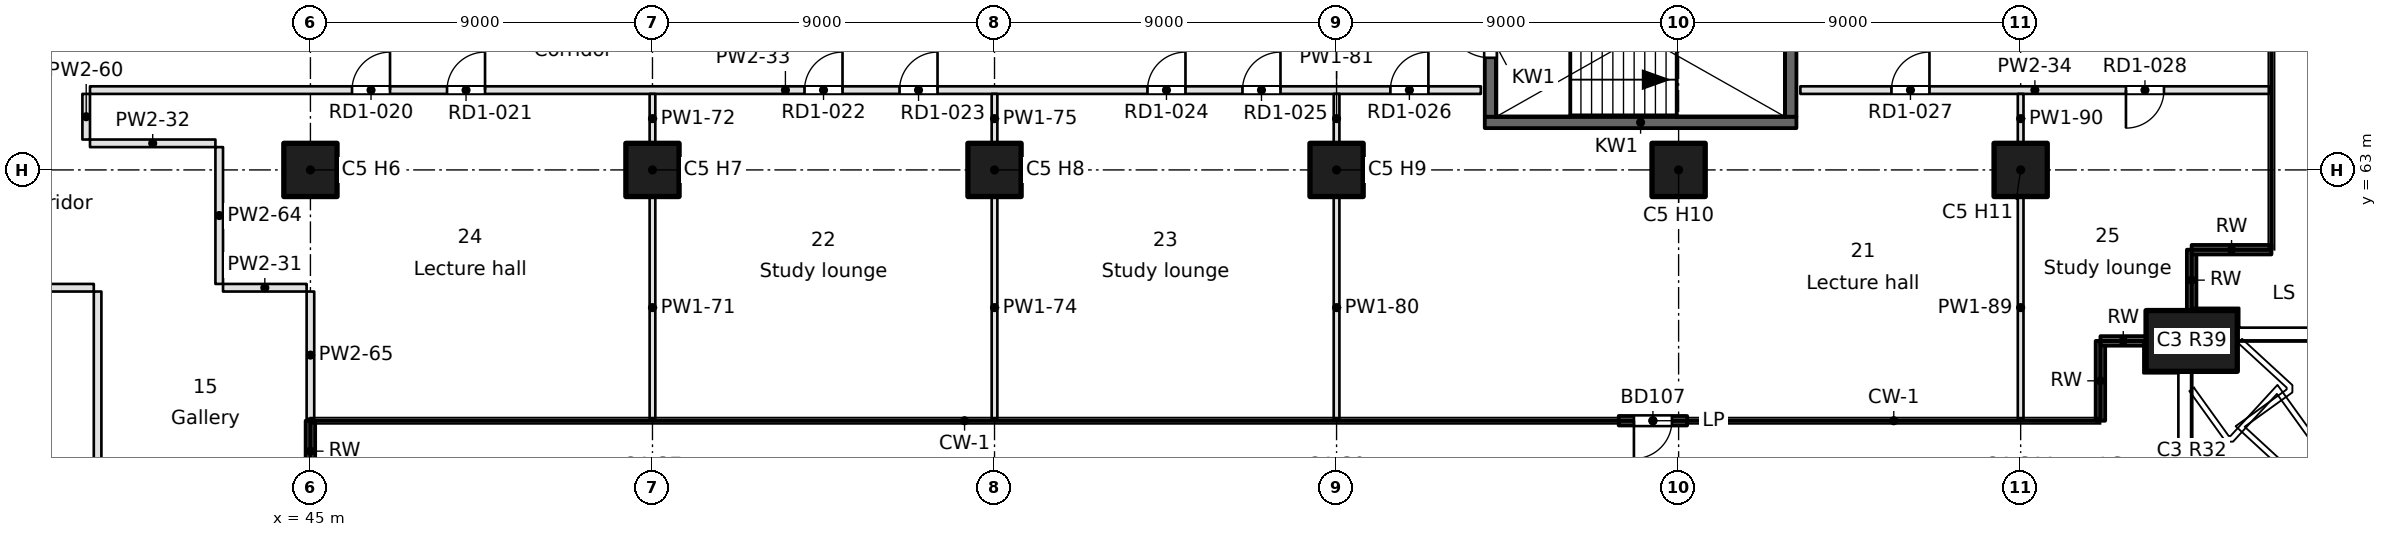
"""IFC4 building model, lengths in metres.
Left out: names, types, materials, properties, quantities, classifications, styles, units other than length and angle.
Written with IfcOpenShell. Run it as: python <this file> out.ifc"""

import sys

from ifc_helpers import new_model, si_unit, direction, frame, frame_2d, origin, origin_2d, place, context, subcontext, project, spatial, rectangle, extrude, element, fill, save


model = new_model("IFC4")
c1 = context("Model", 3, precision=1e-05, world=origin(), true_north=direction((0.0, 1.0)))
c2 = subcontext(c1, "Body", "Model", "MODEL_VIEW")
j1 = project(units=[si_unit("LENGTHUNIT", "METRE"), si_unit("PLANEANGLEUNIT", "RADIAN")], contexts=[c1])
p1 = place(None, origin())
s1 = spatial("IfcSite", under=j1, at=p1, CompositionType="ELEMENT")
p2 = place(p1, origin())
s2 = spatial("IfcBuilding", under=s1, at=p2, CompositionType="ELEMENT")
p3 = place(p2, frame((0.0, 0.0, 72.8)))
s3 = spatial("IfcBuildingStorey", under=s2, at=p3, CompositionType="ELEMENT", Elevation=72.8)
p4 = place(p3, frame((94.5, 58.5, 0.0), z_axis=(0.0, 0.0, 1.0), x_axis=(1.0, 0.0, 0.0)))
e1 = element("IfcColumn", 1, at=p4, inside=s3, PredefinedType="COLUMN", context=c2, shape_type="SweptSolid", body=[
    extrude(rectangle(XDim=2.4, YDim=1.6, at=origin_2d()), origin(), (0.0, 0.0, 1.0), 3.7),
])
for number, where, z_axis, x_axis in (
    (2, (45.0, 63.0, 0.0), (0.0, 0.0, 1.0), (1.0, 0.0, 0.0)),
    (3, (54.0, 63.0, 0.0), (0.0, 0.0, 1.0), (1.0, 0.0, 0.0)),
    (4, (63.0, 63.0, 0.0), (0.0, 0.0, 1.0), (1.0, 0.0, 0.0)),
    (5, (72.0, 63.0, 0.0), (0.0, 0.0, 1.0), (1.0, 0.0, 0.0)),
    (6, (81.0, 63.0, 0.0), (0.0, 0.0, 1.0), (1.0, 0.0, 0.0)),
    (7, (90.0, 63.0, 0.0), (0.0, 0.0, 1.0), (1.0, 0.0, 0.0)),
):
    element("IfcColumn", number, at=place(p3, frame(where, z_axis=z_axis, x_axis=x_axis)), inside=s3, PredefinedType="COLUMN", context=c2, shape_type="SweptSolid", body=[
        extrude(rectangle(XDim=1.4, YDim=1.4, at=origin_2d()), origin(), (0.0, 0.0, 1.0), 3.7),
    ])
p5 = place(p3, frame((44.999, 54.8, 0.0), z_axis=(0.0, 0.0, 1.0), x_axis=(0.000152508767, 0.999999988371, 0.0)))
e8 = element("IfcWall", 8, at=p5, inside=s3, PredefinedType="SOLIDWALL", context=c2, shape_type="SweptSolid", body=[
    extrude(rectangle(XDim=1.601, YDim=0.25, at=frame_2d((0.8, 0.0))), origin(), (0.0, 0.0, 1.0), 3.3),
])
p6 = place(p3, frame((79.424, 56.401, 0.0), z_axis=(0.0, 0.0, 1.0), x_axis=(1.0, 0.0, 0.0)))
e9 = element("IfcWall", 9, at=p6, inside=s3, PredefinedType="SOLIDWALL", context=c2, shape_type="SweptSolid", body=[
    extrude(rectangle(XDim=1.8, YDim=0.25, at=frame_2d((0.9, 0.0))), origin(), (0.0, 0.0, 1.0), 3.3),
])
p7 = place(p6, frame((0.4, 0.0, 0.0)))
e10 = element("IfcOpeningElement", 10, at=p7, cuts=e9, PredefinedType="OPENING", context=c2, shape_type="SweptSolid", body=[
    extrude(rectangle(XDim=1.0, YDim=2.1, at=frame_2d((0.5, 1.05))), frame((0.0, 0.125, 0.0), z_axis=(0.0, -1.0, 0.0), x_axis=(1.0, 0.0, 0.0)), (0.0, 0.0, 1.0), 0.25),
])
p8 = place(p3, frame((92.099, 56.401, 0.0), z_axis=(0.0, 0.0, 1.0), x_axis=(0.00011626555, 0.999999993241, 0.0)))
e11 = element("IfcWall", 11, at=p8, inside=s3, PredefinedType="SOLIDWALL", context=c2, shape_type="SweptSolid", body=[
    extrude(rectangle(XDim=2.1, YDim=0.25, at=frame_2d((1.05, 0.0))), origin(), (0.0, 0.0, 1.0), 3.3),
])
p9 = place(p3, frame((92.099, 58.501, 0.0), z_axis=(0.0, 0.0, 1.0), x_axis=(1.0, 0.0, 0.0)))
e12 = element("IfcWall", 12, at=p9, inside=s3, PredefinedType="SOLIDWALL", context=c2, shape_type="SweptSolid", body=[
    extrude(rectangle(XDim=1.201, YDim=0.25, at=frame_2d((0.6, 0.0))), origin(), (0.0, 0.0, 1.0), 3.3),
])
p10 = place(p3, frame((94.499, 59.3, 0.0), z_axis=(0.0, 0.0, 1.0), x_axis=(0.00015253203, 0.999999988367, 0.0)))
e13 = element("IfcWall", 13, at=p10, inside=s3, PredefinedType="SOLIDWALL", context=c2, shape_type="SweptSolid", body=[
    extrude(rectangle(XDim=1.601, YDim=0.25, at=frame_2d((0.8, 0.0))), origin(), (0.0, 0.0, 1.0), 3.3),
])
p11 = place(p3, frame((94.499, 60.901, 0.0), z_axis=(0.0, 0.0, 1.0), x_axis=(0.999999993241, 0.00011626555, 0.0)))
e14 = element("IfcWall", 14, at=p11, inside=s3, PredefinedType="SOLIDWALL", context=c2, shape_type="SweptSolid", body=[
    extrude(rectangle(XDim=2.1, YDim=0.25, at=frame_2d((1.05, 0.0))), origin(), (0.0, 0.0, 1.0), 3.3),
])
p12 = place(p3, frame((75.9, 64.25, -0.4), z_axis=(0.0, 0.0, 1.0), x_axis=(1.0, 0.0, 0.0)))
e15 = element("IfcWall", 15, at=p12, inside=s3, PredefinedType="SOLIDWALL", context=c2, shape_type="SweptSolid", body=[
    extrude(rectangle(XDim=8.2, YDim=0.3, at=frame_2d((4.1, 0.0))), origin(), (0.0, 0.0, 1.0), 3.7),
])
p13 = place(p3, frame((76.05, 64.4, -0.4), z_axis=(0.0, 0.0, 1.0), x_axis=(0.0, 1.0, 0.0)))
e16 = element("IfcWall", 16, at=p13, inside=s3, PredefinedType="SOLIDWALL", context=c2, shape_type="SweptSolid", body=[
    extrude(rectangle(XDim=4.3, YDim=0.3, at=frame_2d((2.15, 0.0))), origin(), (0.0, 0.0, 1.0), 3.7),
])
p14 = place(p13, frame((1.55, 0.0, 0.4)))
e17 = element("IfcOpeningElement", 17, at=p14, cuts=e16, PredefinedType="OPENING", context=c2, shape_type="SweptSolid", body=[
    extrude(rectangle(XDim=1.2, YDim=2.1, at=frame_2d((0.6, 1.05))), frame((0.0, 0.15, 0.0), z_axis=(0.0, -1.0, 0.0), x_axis=(1.0, 0.0, 0.0)), (0.0, 0.0, 1.0), 0.3),
])
p15 = place(p3, frame((83.95, 64.4, -0.4), z_axis=(0.0, 0.0, 1.0), x_axis=(0.0, 1.0, 0.0)))
e18 = element("IfcWall", 18, at=p15, inside=s3, PredefinedType="SOLIDWALL", context=c2, shape_type="SweptSolid", body=[
    extrude(rectangle(XDim=4.3, YDim=0.3, at=frame_2d((2.15, 0.0))), origin(), (0.0, 0.0, 1.0), 3.7),
])
p16 = place(p3, frame((39.3, 59.9, 0.0), z_axis=(0.0, 0.0, 1.0), x_axis=(-1.0, 0.0, 0.0)))
e19 = element("IfcWall", 19, at=p16, inside=s3, PredefinedType="PARTITIONING", context=c2, shape_type="SweptSolid", body=[
    extrude(rectangle(XDim=11.8, YDim=0.2, at=frame_2d((5.9, 0.0))), origin(), (0.0, 0.0, 1.0), 3.3),
])
p17 = place(p3, frame((42.7, 59.9, 0.0), z_axis=(0.0, 0.0, 1.0), x_axis=(1.0, 0.0, 0.0)))
e20 = element("IfcWall", 20, at=p17, inside=s3, PredefinedType="PARTITIONING", context=c2, shape_type="SweptSolid", body=[
    extrude(rectangle(XDim=2.2, YDim=0.2, at=frame_2d((1.1, 0.0))), origin(), (0.0, 0.0, 1.0), 3.3),
])
p18 = place(p3, frame((39.2, 63.7, 0.0), z_axis=(0.0, 0.0, 1.0), x_axis=(1.0, 0.0, 0.0)))
e21 = element("IfcWall", 21, at=p18, inside=s3, PredefinedType="PARTITIONING", context=c2, shape_type="SweptSolid", body=[
    extrude(rectangle(XDim=3.3, YDim=0.2, at=frame_2d((1.65, 0.0))), origin(), (0.0, 0.0, 1.0), 3.3),
])
p19 = place(p3, frame((75.796, 65.1, 0.0), z_axis=(0.0, 0.0, 1.0), x_axis=(-1.0, 0.0, 0.0)))
e22 = element("IfcWall", 22, at=p19, inside=s3, PredefinedType="PARTITIONING", context=c2, shape_type="SweptSolid", body=[
    extrude(rectangle(XDim=36.596, YDim=0.2, at=frame_2d((18.298, 0.0))), origin(), (0.0, 0.0, 1.0), 3.3),
])
p20 = place(p19, frame((28.702, 0.0, 0.0)))
e23 = element("IfcOpeningElement", 23, at=p20, cuts=e22, PredefinedType="OPENING", context=c2, shape_type="SweptSolid", body=[
    extrude(rectangle(XDim=1.0, YDim=2.1, at=frame_2d((0.5, 1.05))), frame((0.0, 0.1, 0.0), z_axis=(0.0, -1.0, 0.0), x_axis=(1.0, 0.0, 0.0)), (0.0, 0.0, 1.0), 0.2),
])
p21 = place(p19, frame((26.202, 0.0, 0.0)))
e24 = element("IfcOpeningElement", 24, at=p21, cuts=e22, PredefinedType="OPENING", context=c2, shape_type="SweptSolid", body=[
    extrude(rectangle(XDim=1.0, YDim=2.1, at=frame_2d((0.5, 1.05))), frame((0.0, 0.1, 0.0), z_axis=(0.0, -1.0, 0.0), x_axis=(1.0, 0.0, 0.0)), (0.0, 0.0, 1.0), 0.2),
])
p22 = place(p19, frame((16.795, 0.0, 0.0)))
e25 = element("IfcOpeningElement", 25, at=p22, cuts=e22, PredefinedType="OPENING", context=c2, shape_type="SweptSolid", body=[
    extrude(rectangle(XDim=1.0, YDim=2.1, at=frame_2d((0.5, 1.05))), frame((0.0, 0.1, 0.0), z_axis=(0.0, -1.0, 0.0), x_axis=(1.0, 0.0, 0.0)), (0.0, 0.0, 1.0), 0.2),
])
p23 = place(p19, frame((14.295, 0.0, 0.0)))
e26 = element("IfcOpeningElement", 26, at=p23, cuts=e22, PredefinedType="OPENING", context=c2, shape_type="SweptSolid", body=[
    extrude(rectangle(XDim=1.0, YDim=2.1, at=frame_2d((0.5, 1.05))), frame((0.0, 0.1, 0.0), z_axis=(0.0, -1.0, 0.0), x_axis=(1.0, 0.0, 0.0)), (0.0, 0.0, 1.0), 0.2),
])
p24 = place(p19, frame((7.772, 0.0, 0.0)))
e27 = element("IfcOpeningElement", 27, at=p24, cuts=e22, PredefinedType="OPENING", context=c2, shape_type="SweptSolid", body=[
    extrude(rectangle(XDim=1.0, YDim=2.1, at=frame_2d((0.5, 1.05))), frame((0.0, 0.1, 0.0), z_axis=(0.0, -1.0, 0.0), x_axis=(1.0, 0.0, 0.0)), (0.0, 0.0, 1.0), 0.2),
])
p25 = place(p19, frame((5.272, 0.0, 0.0)))
e28 = element("IfcOpeningElement", 28, at=p25, cuts=e22, PredefinedType="OPENING", context=c2, shape_type="SweptSolid", body=[
    extrude(rectangle(XDim=1.0, YDim=2.1, at=frame_2d((0.5, 1.05))), frame((0.0, 0.1, 0.0), z_axis=(0.0, -1.0, 0.0), x_axis=(1.0, 0.0, 0.0)), (0.0, 0.0, 1.0), 0.2),
])
p26 = place(p19, frame((1.38, 0.0, 0.0)))
e29 = element("IfcOpeningElement", 29, at=p26, cuts=e22, PredefinedType="OPENING", context=c2, shape_type="SweptSolid", body=[
    extrude(rectangle(XDim=1.0, YDim=2.1, at=frame_2d((0.5, 1.05))), frame((0.0, 0.1, 0.0), z_axis=(0.0, -1.0, 0.0), x_axis=(1.0, 0.0, 0.0)), (0.0, 0.0, 1.0), 0.2),
])
p27 = place(p3, frame((96.545, 65.1, 0.0), z_axis=(0.0, 0.0, 1.0), x_axis=(-1.0, 0.0, 0.0)))
e30 = element("IfcWall", 30, at=p27, inside=s3, PredefinedType="PARTITIONING", context=c2, shape_type="SweptSolid", body=[
    extrude(rectangle(XDim=12.341, YDim=0.2, at=frame_2d((6.17, 0.0))), origin(), (0.0, 0.0, 1.0), 3.3),
])
p28 = place(p27, frame((8.945, 0.0, 0.0)))
e31 = element("IfcOpeningElement", 31, at=p28, cuts=e30, PredefinedType="OPENING", context=c2, shape_type="SweptSolid", body=[
    extrude(rectangle(XDim=1.0, YDim=2.1, at=frame_2d((0.5, 1.05))), frame((0.0, 0.1, 0.0), z_axis=(0.0, -1.0, 0.0), x_axis=(1.0, 0.0, 0.0)), (0.0, 0.0, 1.0), 0.2),
])
p29 = place(p27, frame((2.774, 0.0, 0.0)))
e32 = element("IfcOpeningElement", 32, at=p29, cuts=e30, PredefinedType="OPENING", context=c2, shape_type="SweptSolid", body=[
    extrude(rectangle(XDim=1.0, YDim=2.1, at=frame_2d((0.5, 1.05))), frame((0.0, 0.1, 0.0), z_axis=(0.0, -1.0, 0.0), x_axis=(1.0, 0.0, 0.0)), (0.0, 0.0, 1.0), 0.2),
])
p30 = place(p3, frame((39.1, 65.0, 0.0), z_axis=(0.0, 0.0, 1.0), x_axis=(0.0, -1.0, 0.0)))
e33 = element("IfcWall", 33, at=p30, inside=s3, PredefinedType="PARTITIONING", context=c2, shape_type="SweptSolid", body=[
    extrude(rectangle(XDim=1.2, YDim=0.2, at=frame_2d((0.6, 0.0))), origin(), (0.0, 0.0, 1.0), 3.3),
])
p31 = place(p3, frame((39.4, 16.991, 0.0), z_axis=(0.0, 0.0, 1.0), x_axis=(0.0, 1.0, 0.0)))
e34 = element("IfcWall", 34, at=p31, inside=s3, PredefinedType="PARTITIONING", context=c2, shape_type="SweptSolid", body=[
    extrude(rectangle(XDim=42.809, YDim=0.2, at=frame_2d((21.405, 0.0))), origin(), (0.0, 0.0, 1.0), 3.3),
])
p32 = place(p31, frame((4.608, 0.0, 0.0)))
e35 = element("IfcOpeningElement", 35, at=p32, cuts=e34, PredefinedType="OPENING", context=c2, shape_type="SweptSolid", body=[
    extrude(rectangle(XDim=1.8, YDim=2.1, at=frame_2d((0.9, 1.05))), frame((0.0, 0.1, 0.0), z_axis=(0.0, -1.0, 0.0), x_axis=(1.0, 0.0, 0.0)), (0.0, 0.0, 1.0), 0.2),
])
p33 = place(p31, frame((13.62, 0.0, 0.0)))
e36 = element("IfcOpeningElement", 36, at=p33, cuts=e34, PredefinedType="OPENING", context=c2, shape_type="SweptSolid", body=[
    extrude(rectangle(XDim=1.8, YDim=2.1, at=frame_2d((0.9, 1.05))), frame((0.0, 0.1, 0.0), z_axis=(0.0, -1.0, 0.0), x_axis=(1.0, 0.0, 0.0)), (0.0, 0.0, 1.0), 0.2),
])
p34 = place(p31, frame((22.633, 0.0, 0.0)))
e37 = element("IfcOpeningElement", 37, at=p34, cuts=e34, PredefinedType="OPENING", context=c2, shape_type="SweptSolid", body=[
    extrude(rectangle(XDim=1.8, YDim=2.1, at=frame_2d((0.9, 1.05))), frame((0.0, 0.1, 0.0), z_axis=(0.0, -1.0, 0.0), x_axis=(1.0, 0.0, 0.0)), (0.0, 0.0, 1.0), 0.2),
])
p35 = place(p31, frame((34.524, 0.0, 0.0)))
e38 = element("IfcOpeningElement", 38, at=p35, cuts=e34, PredefinedType="OPENING", context=c2, shape_type="SweptSolid", body=[
    extrude(rectangle(XDim=1.8, YDim=2.1, at=frame_2d((0.9, 1.05))), frame((0.0, 0.1, 0.0), z_axis=(0.0, -1.0, 0.0), x_axis=(1.0, 0.0, 0.0)), (0.0, 0.0, 1.0), 0.2),
])
p36 = place(p3, frame((42.6, 63.6, 0.0), z_axis=(0.0, 0.0, 1.0), x_axis=(0.0, -1.0, 0.0)))
e39 = element("IfcWall", 39, at=p36, inside=s3, PredefinedType="PARTITIONING", context=c2, shape_type="SweptSolid", body=[
    extrude(rectangle(XDim=3.6, YDim=0.2, at=frame_2d((1.8, 0.0))), origin(), (0.0, 0.0, 1.0), 3.3),
])
p37 = place(p3, frame((45.0, 59.8, 0.0), z_axis=(0.0, 0.0, 1.0), x_axis=(0.0, -1.0, 0.0)))
e40 = element("IfcWall", 40, at=p37, inside=s3, PredefinedType="PARTITIONING", context=c2, shape_type="SweptSolid", body=[
    extrude(rectangle(XDim=3.345, YDim=0.2, at=frame_2d((1.673, 0.0))), origin(), (0.0, 0.0, 1.0), 3.3),
])
p38 = place(p3, frame((54.0, 62.3, 0.0), z_axis=(0.0, 0.0, 1.0), x_axis=(0.0, -1.0, 0.0)))
e41 = element("IfcWall", 41, at=p38, inside=s3, PredefinedType="PARTITIONING", context=c2, shape_type="SweptSolid", body=[
    extrude(rectangle(XDim=5.845, YDim=0.15, at=frame_2d((2.923, 0.0))), origin(), (0.0, 0.0, 1.0), 3.3),
])
p39 = place(p3, frame((54.0, 65.0, 0.0), z_axis=(0.0, 0.0, 1.0), x_axis=(0.0, -1.0, 0.0)))
e42 = element("IfcWall", 42, at=p39, inside=s3, PredefinedType="PARTITIONING", context=c2, shape_type="SweptSolid", body=[
    extrude(rectangle(XDim=1.3, YDim=0.15, at=frame_2d((0.65, 0.0))), origin(), (0.0, 0.0, 1.0), 3.3),
])
p40 = place(p3, frame((63.0, 62.3, 0.0), z_axis=(0.0, 0.0, 1.0), x_axis=(0.0, -1.0, 0.0)))
e43 = element("IfcWall", 43, at=p40, inside=s3, PredefinedType="PARTITIONING", context=c2, shape_type="SweptSolid", body=[
    extrude(rectangle(XDim=5.845, YDim=0.15, at=frame_2d((2.923, 0.0))), origin(), (0.0, 0.0, 1.0), 3.3),
])
p41 = place(p3, frame((63.0, 65.0, 0.0), z_axis=(0.0, 0.0, 1.0), x_axis=(0.0, -1.0, 0.0)))
e44 = element("IfcWall", 44, at=p41, inside=s3, PredefinedType="PARTITIONING", context=c2, shape_type="SweptSolid", body=[
    extrude(rectangle(XDim=1.3, YDim=0.15, at=frame_2d((0.65, 0.0))), origin(), (0.0, 0.0, 1.0), 3.3),
])
p42 = place(p3, frame((72.0, 62.3, 0.0), z_axis=(0.0, 0.0, 1.0), x_axis=(0.0, -1.0, 0.0)))
e45 = element("IfcWall", 45, at=p42, inside=s3, PredefinedType="PARTITIONING", context=c2, shape_type="SweptSolid", body=[
    extrude(rectangle(XDim=5.845, YDim=0.15, at=frame_2d((2.923, 0.0))), origin(), (0.0, 0.0, 1.0), 3.3),
])
p43 = place(p3, frame((72.0, 65.0, 0.0), z_axis=(0.0, 0.0, 1.0), x_axis=(0.0, -1.0, 0.0)))
e46 = element("IfcWall", 46, at=p43, inside=s3, PredefinedType="PARTITIONING", context=c2, shape_type="SweptSolid", body=[
    extrude(rectangle(XDim=1.3, YDim=0.15, at=frame_2d((0.65, 0.0))), origin(), (0.0, 0.0, 1.0), 3.3),
])
p44 = place(p3, frame((90.0, 62.3, 0.0), z_axis=(0.0, 0.0, 1.0), x_axis=(0.0, -1.0, 0.0)))
e47 = element("IfcWall", 47, at=p44, inside=s3, PredefinedType="PARTITIONING", context=c2, shape_type="SweptSolid", body=[
    extrude(rectangle(XDim=5.845, YDim=0.15, at=frame_2d((2.922, 0.0))), origin(), (0.0, 0.0, 1.0), 3.3),
])
p45 = place(p3, frame((90.0, 65.0, 0.0), z_axis=(0.0, 0.0, 1.0), x_axis=(0.0, -1.0, 0.0)))
e48 = element("IfcWall", 48, at=p45, inside=s3, PredefinedType="PARTITIONING", context=c2, shape_type="SweptSolid", body=[
    extrude(rectangle(XDim=1.3, YDim=0.15, at=frame_2d((0.65, 0.0))), origin(), (0.0, 0.0, 1.0), 3.3),
])
p46 = place(p7, frame((1.0, 0.0, 0.0), z_axis=(0.0, 0.0, 1.0), x_axis=(-1.0, 0.0, 0.0)))
e49 = element("IfcDoor", 49, at=p46, inside=s3, OperationType="SINGLE_SWING_RIGHT", PredefinedType="DOOR", context=c2, shape_type="SweptSolid", body=[
    extrude(rectangle(XDim=1.0, YDim=2.1, at=frame_2d((0.5, 1.05))), frame((0.0, 0.025, 0.0), z_axis=(0.0, -1.0, 0.0), x_axis=(1.0, 0.0, 0.0)), (0.0, 0.0, 1.0), 0.05),
])
fill(e10, e49)
p47 = place(p14, origin())
e50 = element("IfcDoor", 50, at=p47, inside=s3, OperationType="SINGLE_SWING_RIGHT", PredefinedType="DOOR", context=c2, shape_type="SweptSolid", body=[
    extrude(rectangle(XDim=1.2, YDim=2.1, at=frame_2d((0.6, 1.05))), frame((0.0, 0.025, 0.0), z_axis=(0.0, -1.0, 0.0), x_axis=(1.0, 0.0, 0.0)), (0.0, 0.0, 1.0), 0.05),
])
fill(e17, e50)
p48 = place(p20, frame((1.0, 0.0, 0.0), z_axis=(0.0, 0.0, 1.0), x_axis=(-1.0, 0.0, 0.0)))
e51 = element("IfcDoor", 51, at=p48, inside=s3, OperationType="SINGLE_SWING_RIGHT", PredefinedType="DOOR", context=c2, shape_type="SweptSolid", body=[
    extrude(rectangle(XDim=1.0, YDim=2.1, at=frame_2d((0.5, 1.05))), frame((0.0, 0.025, 0.0), z_axis=(0.0, -1.0, 0.0), x_axis=(1.0, 0.0, 0.0)), (0.0, 0.0, 1.0), 0.05),
])
fill(e23, e51)
p49 = place(p21, frame((1.0, 0.0, 0.0), z_axis=(0.0, 0.0, 1.0), x_axis=(-1.0, 0.0, 0.0)))
e52 = element("IfcDoor", 52, at=p49, inside=s3, OperationType="SINGLE_SWING_RIGHT", PredefinedType="DOOR", context=c2, shape_type="SweptSolid", body=[
    extrude(rectangle(XDim=1.0, YDim=2.1, at=frame_2d((0.5, 1.05))), frame((0.0, 0.025, 0.0), z_axis=(0.0, -1.0, 0.0), x_axis=(1.0, 0.0, 0.0)), (0.0, 0.0, 1.0), 0.05),
])
fill(e24, e52)
p50 = place(p22, frame((1.0, 0.0, 0.0), z_axis=(0.0, 0.0, 1.0), x_axis=(-1.0, 0.0, 0.0)))
e53 = element("IfcDoor", 53, at=p50, inside=s3, OperationType="SINGLE_SWING_RIGHT", PredefinedType="DOOR", context=c2, shape_type="SweptSolid", body=[
    extrude(rectangle(XDim=1.0, YDim=2.1, at=frame_2d((0.5, 1.05))), frame((0.0, 0.025, 0.0), z_axis=(0.0, -1.0, 0.0), x_axis=(1.0, 0.0, 0.0)), (0.0, 0.0, 1.0), 0.05),
])
fill(e25, e53)
p51 = place(p23, frame((1.0, 0.0, 0.0), z_axis=(0.0, 0.0, 1.0), x_axis=(-1.0, 0.0, 0.0)))
e54 = element("IfcDoor", 54, at=p51, inside=s3, OperationType="SINGLE_SWING_RIGHT", PredefinedType="DOOR", context=c2, shape_type="SweptSolid", body=[
    extrude(rectangle(XDim=1.0, YDim=2.1, at=frame_2d((0.5, 1.05))), frame((0.0, 0.025, 0.0), z_axis=(0.0, -1.0, 0.0), x_axis=(1.0, 0.0, 0.0)), (0.0, 0.0, 1.0), 0.05),
])
fill(e26, e54)
p52 = place(p24, frame((1.0, 0.0, 0.0), z_axis=(0.0, 0.0, 1.0), x_axis=(-1.0, 0.0, 0.0)))
e55 = element("IfcDoor", 55, at=p52, inside=s3, OperationType="SINGLE_SWING_RIGHT", PredefinedType="DOOR", context=c2, shape_type="SweptSolid", body=[
    extrude(rectangle(XDim=1.0, YDim=2.1, at=frame_2d((0.5, 1.05))), frame((0.0, 0.025, 0.0), z_axis=(0.0, -1.0, 0.0), x_axis=(1.0, 0.0, 0.0)), (0.0, 0.0, 1.0), 0.05),
])
fill(e27, e55)
p53 = place(p25, frame((1.0, 0.0, 0.0), z_axis=(0.0, 0.0, 1.0), x_axis=(-1.0, 0.0, 0.0)))
e56 = element("IfcDoor", 56, at=p53, inside=s3, OperationType="SINGLE_SWING_RIGHT", PredefinedType="DOOR", context=c2, shape_type="SweptSolid", body=[
    extrude(rectangle(XDim=1.0, YDim=2.1, at=frame_2d((0.5, 1.05))), frame((0.0, 0.025, 0.0), z_axis=(0.0, -1.0, 0.0), x_axis=(1.0, 0.0, 0.0)), (0.0, 0.0, 1.0), 0.05),
])
fill(e28, e56)
p54 = place(p26, frame((1.0, 0.0, 0.0), z_axis=(0.0, 0.0, 1.0), x_axis=(-1.0, 0.0, 0.0)))
e57 = element("IfcDoor", 57, at=p54, inside=s3, OperationType="SINGLE_SWING_RIGHT", PredefinedType="DOOR", context=c2, shape_type="SweptSolid", body=[
    extrude(rectangle(XDim=1.0, YDim=2.1, at=frame_2d((0.5, 1.05))), frame((0.0, 0.025, 0.0), z_axis=(0.0, -1.0, 0.0), x_axis=(1.0, 0.0, 0.0)), (0.0, 0.0, 1.0), 0.05),
])
fill(e29, e57)
p55 = place(p28, frame((1.0, 0.0, 0.0), z_axis=(0.0, 0.0, 1.0), x_axis=(-1.0, 0.0, 0.0)))
e58 = element("IfcDoor", 58, at=p55, inside=s3, OperationType="SINGLE_SWING_RIGHT", PredefinedType="DOOR", context=c2, shape_type="SweptSolid", body=[
    extrude(rectangle(XDim=1.0, YDim=2.1, at=frame_2d((0.5, 1.05))), frame((0.0, 0.025, 0.0), z_axis=(0.0, -1.0, 0.0), x_axis=(1.0, 0.0, 0.0)), (0.0, 0.0, 1.0), 0.05),
])
fill(e31, e58)
p56 = place(p29, origin())
e59 = element("IfcDoor", 59, at=p56, inside=s3, OperationType="SINGLE_SWING_RIGHT", PredefinedType="DOOR", context=c2, shape_type="SweptSolid", body=[
    extrude(rectangle(XDim=1.0, YDim=2.1, at=frame_2d((0.5, 1.05))), frame((0.0, 0.025, 0.0), z_axis=(0.0, -1.0, 0.0), x_axis=(1.0, 0.0, 0.0)), (0.0, 0.0, 1.0), 0.05),
])
fill(e32, e59)
save(model, sys.argv[1])
